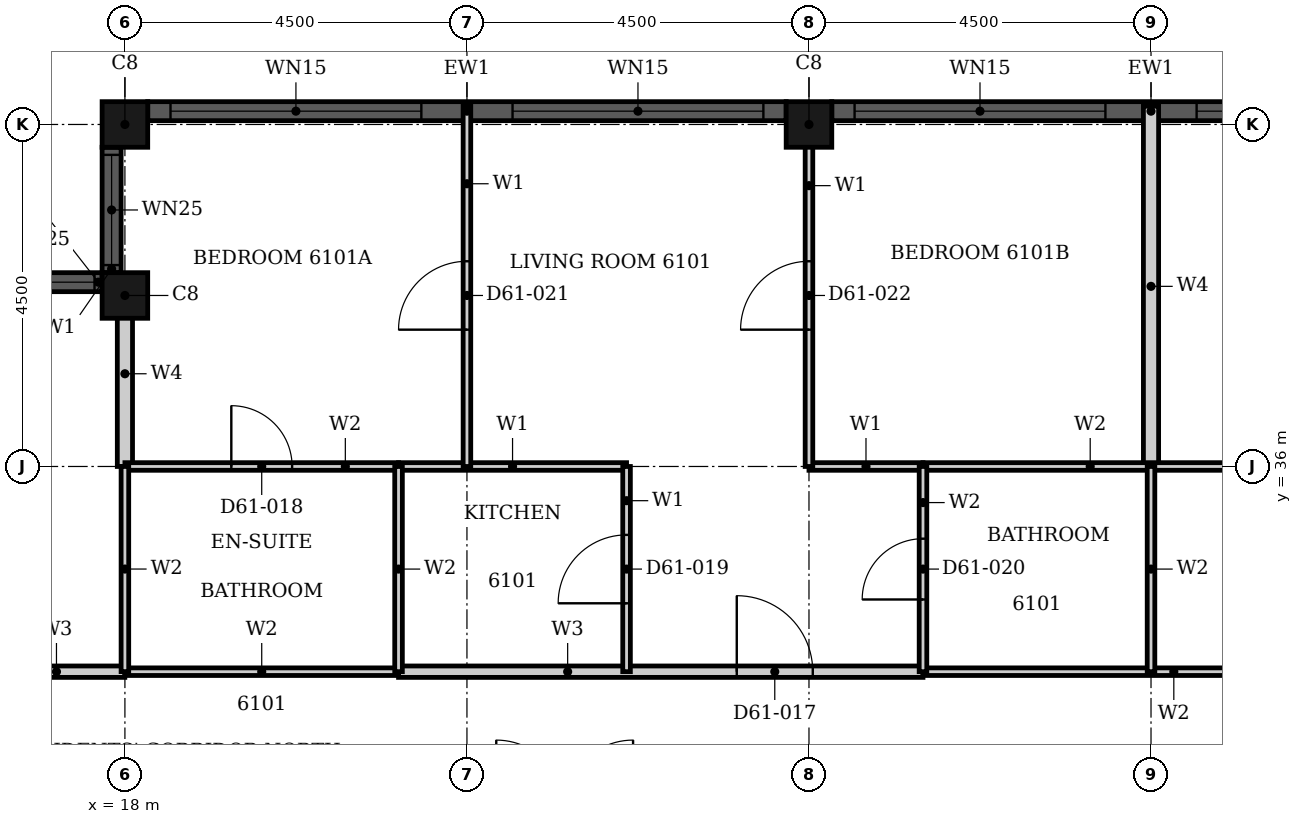
"""IFC4 building model, lengths in metres.
Left out: names, types, materials, properties, quantities, classifications, styles, units other than length and angle.
Written with IfcOpenShell. Run it as: python <this file> out.ifc"""

import sys

from ifc_helpers import new_model, si_unit, direction, frame, frame_2d, origin, origin_2d, place, context, subcontext, project, spatial, rectangle, hollow_rectangle, extrude, element, fill, save


model = new_model("IFC4")
c1 = context("Model", 3, precision=1e-05, world=origin(), true_north=direction((0.0, 1.0)))
c2 = subcontext(c1, "Body", "Model", "MODEL_VIEW")
j1 = project(units=[si_unit("LENGTHUNIT", "METRE"), si_unit("PLANEANGLEUNIT", "RADIAN")], contexts=[c1])
p1 = place(None, origin())
s1 = spatial("IfcSite", under=j1, at=p1, CompositionType="ELEMENT")
p2 = place(p1, origin())
s2 = spatial("IfcBuilding", under=s1, at=p2, CompositionType="ELEMENT")
p3 = place(p2, frame((0.0, 0.0, 241.6)))
s3 = spatial("IfcBuildingStorey", under=s2, at=p3, CompositionType="ELEMENT", Elevation=241.6)
for number, where, z_axis, x_axis in (
    (1, (27.0, 40.5, 0.0), (0.0, 0.0, 1.0), (1.0, 0.0, 0.0)),
    (2, (18.0, 40.5, 0.0), (0.0, 0.0, 1.0), (1.0, 0.0, 0.0)),
    (3, (18.0, 38.25, 0.0), (0.0, 0.0, 1.0), (1.0, 0.0, 0.0)),
):
    element("IfcColumn", number, at=place(p3, frame(where, z_axis=z_axis, x_axis=x_axis)), inside=s3, PredefinedType="COLUMN", context=c2, shape_type="SweptSolid", body=[
        extrude(hollow_rectangle(XDim=0.6, YDim=0.6, WallThickness=0.02, at=origin_2d()), origin(), (0.0, 0.0, 1.0), 3.7),
    ])
p4 = place(p3, frame((35.7, 40.675, 0.0), z_axis=(0.0, 0.0, 1.0), x_axis=(-1.0, 0.0, 0.0)))
e4 = element("IfcWall", 4, at=p4, inside=s3, PredefinedType="SOLIDWALL", context=c2, shape_type="SweptSolid", body=[
    extrude(rectangle(XDim=8.4, YDim=0.25, at=frame_2d((4.2, 0.0))), origin(), (0.0, 0.0, 1.0), 3.7),
])
p5 = place(p4, frame((0.3, 0.0, 0.45)))
e5 = element("IfcOpeningElement", 5, at=p5, cuts=e4, PredefinedType="OPENING", context=c2, shape_type="SweptSolid", body=[
    extrude(rectangle(XDim=3.3, YDim=2.3, at=frame_2d((1.65, 1.15))), frame((0.0, 0.135, 0.0), z_axis=(0.0, -1.0, 0.0), x_axis=(1.0, 0.0, 0.0)), (0.0, 0.0, 1.0), 0.27),
])
p6 = place(p4, frame((4.8, 0.0, 0.45)))
e6 = element("IfcOpeningElement", 6, at=p6, cuts=e4, PredefinedType="OPENING", context=c2, shape_type="SweptSolid", body=[
    extrude(rectangle(XDim=3.3, YDim=2.3, at=frame_2d((1.65, 1.15))), frame((0.0, 0.135, 0.0), z_axis=(0.0, -1.0, 0.0), x_axis=(1.0, 0.0, 0.0)), (0.0, 0.0, 1.0), 0.27),
])
p7 = place(p3, frame((26.7, 40.675, 0.0), z_axis=(0.0, 0.0, 1.0), x_axis=(-1.0, 0.0, 0.0)))
e7 = element("IfcWall", 7, at=p7, inside=s3, PredefinedType="SOLIDWALL", context=c2, shape_type="SweptSolid", body=[
    extrude(rectangle(XDim=8.4, YDim=0.25, at=frame_2d((4.2, 0.0))), origin(), (0.0, 0.0, 1.0), 3.7),
])
p8 = place(p7, frame((0.3, 0.0, 0.45)))
e8 = element("IfcOpeningElement", 8, at=p8, cuts=e7, PredefinedType="OPENING", context=c2, shape_type="SweptSolid", body=[
    extrude(rectangle(XDim=3.3, YDim=2.3, at=frame_2d((1.65, 1.15))), frame((0.0, 0.135, 0.0), z_axis=(0.0, -1.0, 0.0), x_axis=(1.0, 0.0, 0.0)), (0.0, 0.0, 1.0), 0.27),
])
p9 = place(p7, frame((4.8, 0.0, 0.45)))
e9 = element("IfcOpeningElement", 9, at=p9, cuts=e7, PredefinedType="OPENING", context=c2, shape_type="SweptSolid", body=[
    extrude(rectangle(XDim=3.3, YDim=2.3, at=frame_2d((1.65, 1.15))), frame((0.0, 0.135, 0.0), z_axis=(0.0, -1.0, 0.0), x_axis=(1.0, 0.0, 0.0)), (0.0, 0.0, 1.0), 0.27),
])
p10 = place(p3, frame((17.825, 40.2, 0.0), z_axis=(0.0, 0.0, 1.0), x_axis=(0.0, -1.0, 0.0)))
e10 = element("IfcWall", 10, at=p10, inside=s3, PredefinedType="SOLIDWALL", context=c2, shape_type="SweptSolid", body=[
    extrude(rectangle(XDim=1.65, YDim=0.25, at=frame_2d((0.825, 0.0))), origin(), (0.0, 0.0, 1.0), 3.7),
])
p11 = place(p10, frame((0.1, 0.0, 0.9)))
e11 = element("IfcOpeningElement", 11, at=p11, cuts=e10, PredefinedType="OPENING", context=c2, shape_type="SweptSolid", body=[
    extrude(rectangle(XDim=1.45, YDim=1.85, at=frame_2d((0.725, 0.925))), frame((0.0, 0.135, 0.0), z_axis=(0.0, -1.0, 0.0), x_axis=(1.0, 0.0, 0.0)), (0.0, 0.0, 1.0), 0.27),
])
p12 = place(p3, frame((17.7, 38.425, 0.0), z_axis=(0.0, 0.0, 1.0), x_axis=(-1.0, 0.0, 0.0)))
e12 = element("IfcWall", 12, at=p12, inside=s3, PredefinedType="SOLIDWALL", context=c2, shape_type="SweptSolid", body=[
    extrude(rectangle(XDim=1.65, YDim=0.25, at=frame_2d((0.825, 0.0))), origin(), (0.0, 0.0, 1.0), 3.7),
])
p13 = place(p12, frame((0.1, 0.0, 0.9)))
e13 = element("IfcOpeningElement", 13, at=p13, cuts=e12, PredefinedType="OPENING", context=c2, shape_type="SweptSolid", body=[
    extrude(rectangle(XDim=1.45, YDim=1.85, at=frame_2d((0.725, 0.925))), frame((0.0, 0.135, 0.0), z_axis=(0.0, -1.0, 0.0), x_axis=(1.0, 0.0, 0.0)), (0.0, 0.0, 1.0), 0.27),
])
p14 = place(p3, frame((21.6, 33.3, 0.0), z_axis=(0.0, 0.0, 1.0), x_axis=(1.0, 0.0, 0.0)))
e14 = element("IfcWall", 14, at=p14, inside=s3, PredefinedType="PARTITIONING", context=c2, shape_type="SweptSolid", body=[
    extrude(rectangle(XDim=6.9, YDim=0.15, at=frame_2d((3.45, 0.0))), origin(), (0.0, 0.0, 1.0), 3.4),
])
p15 = place(p14, frame((4.45, 0.0, 0.0)))
e15 = element("IfcOpeningElement", 15, at=p15, cuts=e14, PredefinedType="OPENING", context=c2, shape_type="SweptSolid", body=[
    extrude(rectangle(XDim=1.0, YDim=2.2, at=frame_2d((0.5, 1.1))), frame((0.0, 0.085, 0.0), z_axis=(0.0, -1.0, 0.0), x_axis=(1.0, 0.0, 0.0)), (0.0, 0.0, 1.0), 0.17),
])
p16 = place(p3, frame((16.2, 33.3, 0.0), z_axis=(0.0, 0.0, 1.0), x_axis=(1.0, 0.0, 0.0)))
e16 = element("IfcWall", 16, at=p16, inside=s3, PredefinedType="PARTITIONING", context=c2, shape_type="SweptSolid", body=[
    extrude(rectangle(XDim=1.799, YDim=0.15, at=frame_2d((0.899, 0.0))), origin(), (0.0, 0.0, 1.0), 3.4),
])
p17 = place(p3, frame((27.0, 36.0, 0.0), z_axis=(0.0, 0.0, 1.0), x_axis=(1.0, 0.0, 0.0)))
e17 = element("IfcWall", 17, at=p17, inside=s3, PredefinedType="PARTITIONING", context=c2, shape_type="SweptSolid", body=[
    extrude(rectangle(XDim=1.5, YDim=0.1, at=frame_2d((0.75, 0.0))), origin(), (0.0, 0.0, 1.0), 3.4),
])
p18 = place(p3, frame((21.6, 36.0, 0.0), z_axis=(0.0, 0.0, 1.0), x_axis=(1.0, 0.0, 0.0)))
e18 = element("IfcWall", 18, at=p18, inside=s3, PredefinedType="PARTITIONING", context=c2, shape_type="SweptSolid", body=[
    extrude(rectangle(XDim=3.0, YDim=0.1, at=frame_2d((1.5, 0.0))), origin(), (0.0, 0.0, 1.0), 3.4),
])
p19 = place(p3, frame((22.5, 36.0, 0.0), z_axis=(0.0, 0.0, 1.0), x_axis=(0.0, 1.0, 0.0)))
e19 = element("IfcWall", 19, at=p19, inside=s3, PredefinedType="PARTITIONING", context=c2, shape_type="SweptSolid", body=[
    extrude(rectangle(XDim=4.74, YDim=0.1, at=frame_2d((2.37, 0.0))), origin(), (0.0, 0.0, 1.0), 3.4),
])
p20 = place(p19, frame((1.8, 0.0, 0.0)))
e20 = element("IfcOpeningElement", 20, at=p20, cuts=e19, PredefinedType="OPENING", context=c2, shape_type="SweptSolid", body=[
    extrude(rectangle(XDim=0.9, YDim=2.1, at=frame_2d((0.45, 1.05))), frame((0.0, 0.06, 0.0), z_axis=(0.0, -1.0, 0.0), x_axis=(1.0, 0.0, 0.0)), (0.0, 0.0, 1.0), 0.12),
])
p21 = place(p3, frame((24.6, 33.3, 0.0), z_axis=(0.0, 0.0, 1.0), x_axis=(0.0, 1.0, 0.0)))
e21 = element("IfcWall", 21, at=p21, inside=s3, PredefinedType="PARTITIONING", context=c2, shape_type="SweptSolid", body=[
    extrude(rectangle(XDim=2.7, YDim=0.1, at=frame_2d((1.35, 0.0))), origin(), (0.0, 0.0, 1.0), 3.4),
])
p22 = place(p21, frame((0.9, 0.0, 0.0)))
e22 = element("IfcOpeningElement", 22, at=p22, cuts=e21, PredefinedType="OPENING", context=c2, shape_type="SweptSolid", body=[
    extrude(rectangle(XDim=0.9, YDim=2.1, at=frame_2d((0.45, 1.05))), frame((0.0, 0.06, 0.0), z_axis=(0.0, -1.0, 0.0), x_axis=(1.0, 0.0, 0.0)), (0.0, 0.0, 1.0), 0.12),
])
p23 = place(p3, frame((27.0, 36.0, 0.0), z_axis=(0.0, 0.0, 1.0), x_axis=(0.0, 1.0, 0.0)))
e23 = element("IfcWall", 23, at=p23, inside=s3, PredefinedType="PARTITIONING", context=c2, shape_type="SweptSolid", body=[
    extrude(rectangle(XDim=4.69, YDim=0.1, at=frame_2d((2.345, 0.0))), origin(), (0.0, 0.0, 1.0), 3.4),
])
p24 = place(p23, frame((1.8, 0.0, 0.0)))
e24 = element("IfcOpeningElement", 24, at=p24, cuts=e23, PredefinedType="OPENING", context=c2, shape_type="SweptSolid", body=[
    extrude(rectangle(XDim=0.9, YDim=2.1, at=frame_2d((0.45, 1.05))), frame((0.0, 0.06, 0.0), z_axis=(0.0, -1.0, 0.0), x_axis=(1.0, 0.0, 0.0)), (0.0, 0.0, 1.0), 0.12),
])
p25 = place(p3, frame((18.0, 36.0, 0.0), z_axis=(0.0, 0.0, 1.0), x_axis=(0.0, 1.0, 0.0)))
e25 = element("IfcWall", 25, at=p25, inside=s3, PredefinedType="PARTITIONING", context=c2, shape_type="SweptSolid", body=[
    extrude(rectangle(XDim=2.44, YDim=0.2, at=frame_2d((1.22, 0.0))), origin(), (0.0, 0.0, 1.0), 3.4),
])
p26 = place(p3, frame((31.5, 36.0, 0.0), z_axis=(0.0, 0.0, 1.0), x_axis=(0.0, 1.0, 0.0)))
e26 = element("IfcWall", 26, at=p26, inside=s3, PredefinedType="PARTITIONING", context=c2, shape_type="SweptSolid", body=[
    extrude(rectangle(XDim=4.74, YDim=0.2, at=frame_2d((2.37, 0.0))), origin(), (0.0, 0.0, 1.0), 3.4),
])
p27 = place(p3, frame((28.5, 33.3, 0.0), z_axis=(0.0, 0.0, 1.0), x_axis=(1.0, 0.0, 0.0)))
e27 = element("IfcWall", 27, at=p27, inside=s3, PredefinedType="PARTITIONING", context=c2, shape_type="SweptSolid", body=[
    extrude(rectangle(XDim=6.6, YDim=0.1, at=frame_2d((3.3, 0.0))), origin(), (0.0, 0.0, 1.0), 3.4),
])
p28 = place(p3, frame((18.0, 33.3, 0.0), z_axis=(0.0, 0.0, 1.0), x_axis=(1.0, 0.0, 0.0)))
e28 = element("IfcWall", 28, at=p28, inside=s3, PredefinedType="PARTITIONING", context=c2, shape_type="SweptSolid", body=[
    extrude(rectangle(XDim=3.6, YDim=0.1, at=frame_2d((1.8, 0.0))), origin(), (0.0, 0.0, 1.0), 3.4),
])
p29 = place(p3, frame((28.5, 36.0, 0.0), z_axis=(0.0, 0.0, 1.0), x_axis=(1.0, 0.0, 0.0)))
e29 = element("IfcWall", 29, at=p29, inside=s3, PredefinedType="PARTITIONING", context=c2, shape_type="SweptSolid", body=[
    extrude(rectangle(XDim=6.6, YDim=0.1, at=frame_2d((3.3, 0.0))), origin(), (0.0, 0.0, 1.0), 3.4),
])
p30 = place(p29, frame((4.4, 0.0, 0.0)))
e30 = element("IfcOpeningElement", 30, at=p30, cuts=e29, PredefinedType="OPENING", context=c2, shape_type="SweptSolid", body=[
    extrude(rectangle(XDim=0.8, YDim=2.1, at=frame_2d((0.4, 1.05))), frame((0.0, 0.06, 0.0), z_axis=(0.0, -1.0, 0.0), x_axis=(1.0, 0.0, 0.0)), (0.0, 0.0, 1.0), 0.12),
])
p31 = place(p3, frame((18.0, 36.0, 0.0), z_axis=(0.0, 0.0, 1.0), x_axis=(1.0, 0.0, 0.0)))
e31 = element("IfcWall", 31, at=p31, inside=s3, PredefinedType="PARTITIONING", context=c2, shape_type="SweptSolid", body=[
    extrude(rectangle(XDim=3.6, YDim=0.1, at=frame_2d((1.8, 0.0))), origin(), (0.0, 0.0, 1.0), 3.4),
])
p32 = place(p31, frame((1.4, 0.0, 0.0)))
e32 = element("IfcOpeningElement", 32, at=p32, cuts=e31, PredefinedType="OPENING", context=c2, shape_type="SweptSolid", body=[
    extrude(rectangle(XDim=0.8, YDim=2.1, at=frame_2d((0.4, 1.05))), frame((0.0, 0.06, 0.0), z_axis=(0.0, -1.0, 0.0), x_axis=(1.0, 0.0, 0.0)), (0.0, 0.0, 1.0), 0.12),
])
p33 = place(p3, frame((18.0, 33.301, 0.0), z_axis=(0.0, 0.0, 1.0), x_axis=(0.0, 1.0, 0.0)))
e33 = element("IfcWall", 33, at=p33, inside=s3, PredefinedType="PARTITIONING", context=c2, shape_type="SweptSolid", body=[
    extrude(rectangle(XDim=2.699, YDim=0.1, at=frame_2d((1.35, 0.0))), origin(), (0.0, 0.0, 1.0), 3.4),
])
p34 = place(p3, frame((21.6, 33.3, 0.0), z_axis=(0.0, 0.0, 1.0), x_axis=(0.0, 1.0, 0.0)))
e34 = element("IfcWall", 34, at=p34, inside=s3, PredefinedType="PARTITIONING", context=c2, shape_type="SweptSolid", body=[
    extrude(rectangle(XDim=2.7, YDim=0.1, at=frame_2d((1.35, 0.0))), origin(), (0.0, 0.0, 1.0), 3.4),
])
p35 = place(p3, frame((28.5, 33.3, 0.0), z_axis=(0.0, 0.0, 1.0), x_axis=(0.0, 1.0, 0.0)))
e35 = element("IfcWall", 35, at=p35, inside=s3, PredefinedType="PARTITIONING", context=c2, shape_type="SweptSolid", body=[
    extrude(rectangle(XDim=2.7, YDim=0.1, at=frame_2d((1.35, 0.0))), origin(), (0.0, 0.0, 1.0), 3.4),
])
p36 = place(p35, frame((0.95, 0.0, 0.0)))
e36 = element("IfcOpeningElement", 36, at=p36, cuts=e35, PredefinedType="OPENING", context=c2, shape_type="SweptSolid", body=[
    extrude(rectangle(XDim=0.8, YDim=2.1, at=frame_2d((0.4, 1.05))), frame((0.0, 0.06, 0.0), z_axis=(0.0, -1.0, 0.0), x_axis=(1.0, 0.0, 0.0)), (0.0, 0.0, 1.0), 0.12),
])
p37 = place(p3, frame((31.5, 33.3, 0.0), z_axis=(0.0, 0.0, 1.0), x_axis=(0.0, 1.0, 0.0)))
e37 = element("IfcWall", 37, at=p37, inside=s3, PredefinedType="PARTITIONING", context=c2, shape_type="SweptSolid", body=[
    extrude(rectangle(XDim=2.7, YDim=0.1, at=frame_2d((1.35, 0.0))), origin(), (0.0, 0.0, 1.0), 3.4),
])
p38 = place(p5, origin())
e38 = element("IfcWindow", 38, at=p38, inside=s3, PartitioningType="SINGLE_PANEL", PredefinedType="WINDOW", context=c2, shape_type="SweptSolid", body=[
    extrude(rectangle(XDim=3.3, YDim=2.3, at=frame_2d((1.65, 1.15))), frame((0.0, 0.03, 0.0), z_axis=(0.0, -1.0, 0.0), x_axis=(1.0, 0.0, 0.0)), (0.0, 0.0, 1.0), 0.06),
])
fill(e5, e38)
p39 = place(p6, origin())
e39 = element("IfcWindow", 39, at=p39, inside=s3, PartitioningType="SINGLE_PANEL", PredefinedType="WINDOW", context=c2, shape_type="SweptSolid", body=[
    extrude(rectangle(XDim=3.3, YDim=2.3, at=frame_2d((1.65, 1.15))), frame((0.0, 0.03, 0.0), z_axis=(0.0, -1.0, 0.0), x_axis=(1.0, 0.0, 0.0)), (0.0, 0.0, 1.0), 0.06),
])
fill(e6, e39)
p40 = place(p8, origin())
e40 = element("IfcWindow", 40, at=p40, inside=s3, PartitioningType="SINGLE_PANEL", PredefinedType="WINDOW", context=c2, shape_type="SweptSolid", body=[
    extrude(rectangle(XDim=3.3, YDim=2.3, at=frame_2d((1.65, 1.15))), frame((0.0, 0.03, 0.0), z_axis=(0.0, -1.0, 0.0), x_axis=(1.0, 0.0, 0.0)), (0.0, 0.0, 1.0), 0.06),
])
fill(e8, e40)
p41 = place(p9, origin())
e41 = element("IfcWindow", 41, at=p41, inside=s3, PartitioningType="SINGLE_PANEL", PredefinedType="WINDOW", context=c2, shape_type="SweptSolid", body=[
    extrude(rectangle(XDim=3.3, YDim=2.3, at=frame_2d((1.65, 1.15))), frame((0.0, 0.03, 0.0), z_axis=(0.0, -1.0, 0.0), x_axis=(1.0, 0.0, 0.0)), (0.0, 0.0, 1.0), 0.06),
])
fill(e9, e41)
p42 = place(p11, origin())
e42 = element("IfcWindow", 42, at=p42, inside=s3, PartitioningType="SINGLE_PANEL", PredefinedType="WINDOW", context=c2, shape_type="SweptSolid", body=[
    extrude(rectangle(XDim=1.45, YDim=1.85, at=frame_2d((0.725, 0.925))), frame((0.0, 0.03, 0.0), z_axis=(0.0, -1.0, 0.0), x_axis=(1.0, 0.0, 0.0)), (0.0, 0.0, 1.0), 0.06),
])
fill(e11, e42)
p43 = place(p13, origin())
e43 = element("IfcWindow", 43, at=p43, inside=s3, PartitioningType="SINGLE_PANEL", PredefinedType="WINDOW", context=c2, shape_type="SweptSolid", body=[
    extrude(rectangle(XDim=1.45, YDim=1.85, at=frame_2d((0.725, 0.925))), frame((0.0, 0.03, 0.0), z_axis=(0.0, -1.0, 0.0), x_axis=(1.0, 0.0, 0.0)), (0.0, 0.0, 1.0), 0.06),
])
fill(e13, e43)
p44 = place(p15, origin())
e44 = element("IfcDoor", 44, at=p44, inside=s3, OperationType="SINGLE_SWING_RIGHT", PredefinedType="DOOR", context=c2, shape_type="SweptSolid", body=[
    extrude(rectangle(XDim=1.0, YDim=2.2, at=frame_2d((0.5, 1.1))), frame((0.0, 0.025, 0.0), z_axis=(0.0, -1.0, 0.0), x_axis=(1.0, 0.0, 0.0)), (0.0, 0.0, 1.0), 0.05),
])
fill(e15, e44)
p45 = place(p32, origin())
e45 = element("IfcDoor", 45, at=p45, inside=s3, OperationType="SINGLE_SWING_RIGHT", PredefinedType="DOOR", context=c2, shape_type="SweptSolid", body=[
    extrude(rectangle(XDim=0.8, YDim=2.1, at=frame_2d((0.4, 1.05))), frame((0.0, 0.025, 0.0), z_axis=(0.0, -1.0, 0.0), x_axis=(1.0, 0.0, 0.0)), (0.0, 0.0, 1.0), 0.05),
])
fill(e32, e45)
p46 = place(p22, origin())
e46 = element("IfcDoor", 46, at=p46, inside=s3, OperationType="SINGLE_SWING_RIGHT", PredefinedType="DOOR", context=c2, shape_type="SweptSolid", body=[
    extrude(rectangle(XDim=0.9, YDim=2.1, at=frame_2d((0.45, 1.05))), frame((0.0, 0.025, 0.0), z_axis=(0.0, -1.0, 0.0), x_axis=(1.0, 0.0, 0.0)), (0.0, 0.0, 1.0), 0.05),
])
fill(e22, e46)
p47 = place(p36, origin())
e47 = element("IfcDoor", 47, at=p47, inside=s3, OperationType="SINGLE_SWING_RIGHT", PredefinedType="DOOR", context=c2, shape_type="SweptSolid", body=[
    extrude(rectangle(XDim=0.8, YDim=2.1, at=frame_2d((0.4, 1.05))), frame((0.0, 0.025, 0.0), z_axis=(0.0, -1.0, 0.0), x_axis=(1.0, 0.0, 0.0)), (0.0, 0.0, 1.0), 0.05),
])
fill(e36, e47)
p48 = place(p20, origin())
e48 = element("IfcDoor", 48, at=p48, inside=s3, OperationType="SINGLE_SWING_LEFT", PredefinedType="DOOR", context=c2, shape_type="SweptSolid", body=[
    extrude(rectangle(XDim=0.9, YDim=2.1, at=frame_2d((0.45, 1.05))), frame((0.0, 0.025, 0.0), z_axis=(0.0, -1.0, 0.0), x_axis=(1.0, 0.0, 0.0)), (0.0, 0.0, 1.0), 0.05),
])
fill(e20, e48)
p49 = place(p24, origin())
e49 = element("IfcDoor", 49, at=p49, inside=s3, OperationType="SINGLE_SWING_LEFT", PredefinedType="DOOR", context=c2, shape_type="SweptSolid", body=[
    extrude(rectangle(XDim=0.9, YDim=2.1, at=frame_2d((0.45, 1.05))), frame((0.0, 0.025, 0.0), z_axis=(0.0, -1.0, 0.0), x_axis=(1.0, 0.0, 0.0)), (0.0, 0.0, 1.0), 0.05),
])
fill(e24, e49)
save(model, sys.argv[1])
